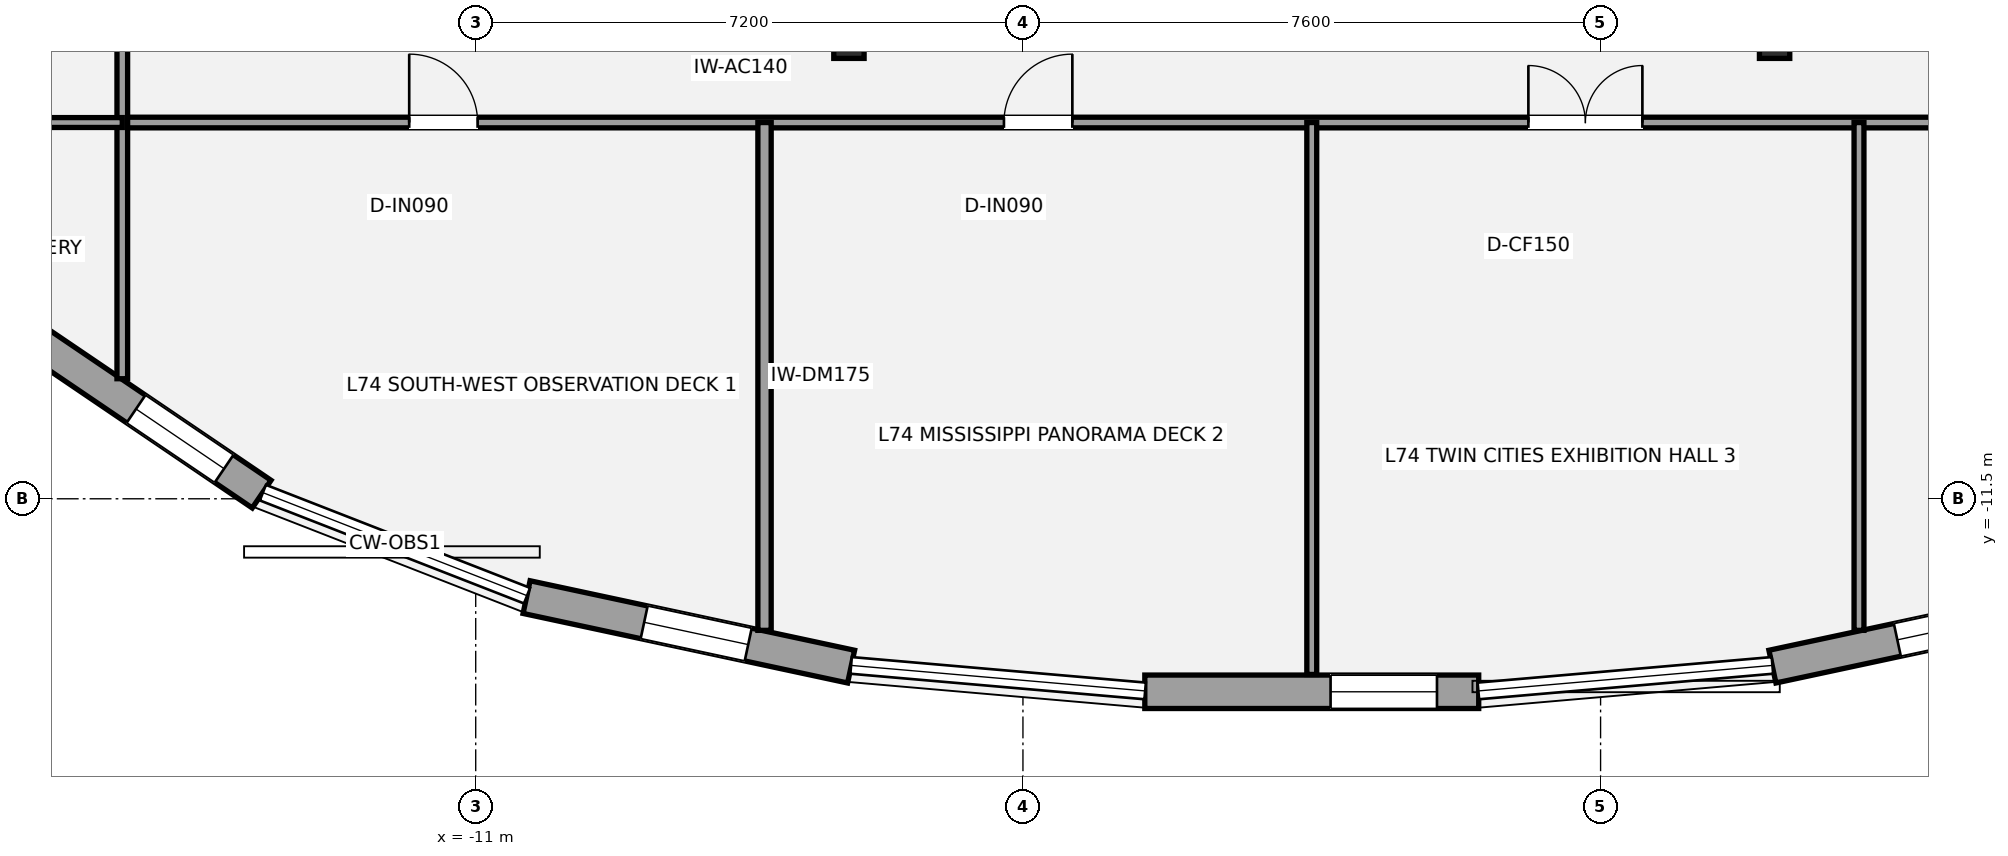
"""IFC4 building model, lengths in metres.
Left out: names, types, materials, properties, quantities, classifications, styles, units other than length and angle.
Written with IfcOpenShell. Run it as: python <this file> out.ifc"""

import sys

from ifc_helpers import new_model, si_unit, direction, frame, frame_2d, origin, origin_2d, place, context, subcontext, project, spatial, rectangle, i_section, extrude, element, fill, save


model = new_model("IFC4")
c1 = context("Model", 3, precision=1e-05, world=origin(), true_north=direction((0.0, 1.0)))
c2 = subcontext(c1, "Body", "Model", "MODEL_VIEW")
j1 = project(units=[si_unit("LENGTHUNIT", "METRE"), si_unit("PLANEANGLEUNIT", "RADIAN")], contexts=[c1])
p1 = place(None, origin())
s1 = spatial("IfcSite", under=j1, at=p1, CompositionType="ELEMENT")
p2 = place(p1, origin())
s2 = spatial("IfcBuilding", under=s1, at=p2, CompositionType="ELEMENT")
p3 = place(p2, frame((0.0, 0.0, 260.4)))
s3 = spatial("IfcBuildingStorey", under=s2, at=p3, CompositionType="ELEMENT", Elevation=260.4)
for number, where, z_axis, x_axis in (
    (1, (-6.09, -5.513, 0.0), (0.0, 0.0, 1.0), (1.0, 0.0, 0.0)),
    (2, (6.09, -5.513, 0.0), (0.0, 0.0, 1.0), (1.0, 0.0, 0.0)),
):
    element("IfcColumn", number, at=place(p3, frame(where, z_axis=z_axis, x_axis=x_axis)), inside=s3, PredefinedType="COLUMN", context=c2, shape_type="SweptSolid", body=[
        extrude(i_section(OverallWidth=0.399, OverallDepth=0.387, WebThickness=0.021, FlangeThickness=0.033, at=origin_2d()), origin(), (0.0, 0.0, 1.0), 4.4),
    ])
p4 = place(p3, frame((-13.817, -11.439, 0.0), z_axis=(0.0, 0.0, 1.0), x_axis=(-0.827716626187, 0.561146314908, 0.0)))
e3 = element("IfcWall", 3, at=p4, inside=s3, PredefinedType="STANDARD", context=c2, shape_type="SweptSolid", body=[
    extrude(rectangle(XDim=3.783, YDim=0.44, at=frame_2d((1.892, 0.0))), origin(), (0.0, 0.0, 1.0), 3.55),
])
p5 = place(p4, frame((0.597, 0.0, 0.58)))
e4 = element("IfcOpeningElement", 4, at=p5, cuts=e3, PredefinedType="OPENING", context=c2, shape_type="SweptSolid", body=[
    extrude(rectangle(XDim=1.4, YDim=1.55, at=frame_2d((0.7, 0.775))), frame((0.0, 0.23, 0.0), z_axis=(0.0, -1.0, 0.0), x_axis=(1.0, 0.0, 0.0)), (0.0, 0.0, 1.0), 0.46),
])
p6 = place(p3, frame((-6.061, -13.708, 0.0), z_axis=(0.0, 0.0, 1.0), x_axis=(-0.977823681193, 0.209429817596, 0.0)))
e5 = element("IfcWall", 5, at=p6, inside=s3, PredefinedType="STANDARD", context=c2, shape_type="SweptSolid", body=[
    extrude(rectangle(XDim=4.367, YDim=0.44, at=frame_2d((2.184, 0.0))), origin(), (0.0, 0.0, 1.0), 3.546),
])
p7 = place(p6, frame((1.385, 0.0, 0.85)))
e6 = element("IfcOpeningElement", 6, at=p7, cuts=e5, PredefinedType="OPENING", context=c2, shape_type="SweptSolid", body=[
    extrude(rectangle(XDim=1.4, YDim=1.55, at=frame_2d((0.7, 0.775))), frame((0.0, 0.23, 0.0), z_axis=(0.0, -1.0, 0.0), x_axis=(1.0, 0.0, 0.0)), (0.0, 0.0, 1.0), 0.46),
])
p8 = place(p3, frame((2.197, -14.039, 0.0), z_axis=(0.0, 0.0, 1.0), x_axis=(-1.0, 0.0, 0.0)))
e7 = element("IfcWall", 7, at=p8, inside=s3, PredefinedType="STANDARD", context=c2, shape_type="SweptSolid", body=[
    extrude(rectangle(XDim=4.393, YDim=0.44, at=frame_2d((2.197, 0.0))), origin(), (0.0, 0.0, 1.0), 3.546),
])
p9 = place(p8, frame((0.549, 0.0, 0.58)))
e8 = element("IfcOpeningElement", 8, at=p9, cuts=e7, PredefinedType="OPENING", context=c2, shape_type="SweptSolid", body=[
    extrude(rectangle(XDim=1.4, YDim=1.55, at=frame_2d((0.7, 0.775))), frame((0.0, 0.23, 0.0), z_axis=(0.0, -1.0, 0.0), x_axis=(1.0, 0.0, 0.0)), (0.0, 0.0, 1.0), 0.46),
])
p10 = place(p3, frame((10.331, -12.794, 0.0), z_axis=(0.0, 0.0, 1.0), x_axis=(-0.977823681193, -0.209429817596, 0.0)))
e9 = element("IfcWall", 9, at=p10, inside=s3, PredefinedType="STANDARD", context=c2, shape_type="SweptSolid", body=[
    extrude(rectangle(XDim=4.367, YDim=0.44, at=frame_2d((2.184, 0.0))), origin(), (0.0, 0.0, 1.0), 3.546),
])
p11 = place(p10, frame((1.286, 0.0, 0.6)))
e10 = element("IfcOpeningElement", 10, at=p11, cuts=e9, PredefinedType="OPENING", context=c2, shape_type="SweptSolid", body=[
    extrude(rectangle(XDim=1.4, YDim=1.55, at=frame_2d((0.7, 0.775))), frame((0.0, 0.23, 0.0), z_axis=(0.0, -1.0, 0.0), x_axis=(1.0, 0.0, 0.0)), (0.0, 0.0, 1.0), 0.46),
])
p12 = place(p3, frame((-15.65, -6.55, 0.0), z_axis=(0.0, 0.0, 1.0), x_axis=(1.0, 0.0, 0.0)))
e11 = element("IfcWall", 11, at=p12, inside=s3, PredefinedType="PARTITIONING", context=c2, shape_type="SweptSolid", body=[
    extrude(rectangle(XDim=31.3, YDim=0.14, at=frame_2d((15.65, 0.0))), origin(), (0.0, 0.0, 1.0), 3.633),
])
p13 = place(p12, frame((3.775, 0.0, 0.0)))
e12 = element("IfcOpeningElement", 12, at=p13, cuts=e11, PredefinedType="OPENING", context=c2, shape_type="SweptSolid", body=[
    extrude(rectangle(XDim=0.9, YDim=2.1, at=frame_2d((0.45, 1.05))), frame((0.0, 0.08, 0.0), z_axis=(0.0, -1.0, 0.0), x_axis=(1.0, 0.0, 0.0)), (0.0, 0.0, 1.0), 0.16),
])
p14 = place(p12, frame((11.6, 0.0, 0.0)))
e13 = element("IfcOpeningElement", 13, at=p14, cuts=e11, PredefinedType="OPENING", context=c2, shape_type="SweptSolid", body=[
    extrude(rectangle(XDim=0.9, YDim=2.1, at=frame_2d((0.45, 1.05))), frame((0.0, 0.08, 0.0), z_axis=(0.0, -1.0, 0.0), x_axis=(1.0, 0.0, 0.0)), (0.0, 0.0, 1.0), 0.16),
])
p15 = place(p12, frame((18.5, 0.0, 0.0)))
e14 = element("IfcOpeningElement", 14, at=p15, cuts=e11, PredefinedType="OPENING", context=c2, shape_type="SweptSolid", body=[
    extrude(rectangle(XDim=1.5, YDim=2.15, at=frame_2d((0.75, 1.075))), frame((0.0, 0.08, 0.0), z_axis=(0.0, -1.0, 0.0), x_axis=(1.0, 0.0, 0.0)), (0.0, 0.0, 1.0), 0.16),
])
p16 = place(p12, frame((26.625, 0.0, 0.0)))
e15 = element("IfcOpeningElement", 15, at=p16, cuts=e11, PredefinedType="OPENING", context=c2, shape_type="SweptSolid", body=[
    extrude(rectangle(XDim=0.9, YDim=2.1, at=frame_2d((0.45, 1.05))), frame((0.0, 0.08, 0.0), z_axis=(0.0, -1.0, 0.0), x_axis=(1.0, 0.0, 0.0)), (0.0, 0.0, 1.0), 0.16),
])
p17 = place(p3, frame((-15.65, -9.921, 0.0), z_axis=(0.0, 0.0, 1.0), x_axis=(0.0, 1.0, 0.0)))
e16 = element("IfcWall", 16, at=p17, inside=s3, PredefinedType="PARTITIONING", context=c2, shape_type="SweptSolid", body=[
    extrude(rectangle(XDim=12.321, YDim=0.14, at=frame_2d((6.16, 0.0))), origin(), (0.0, 0.0, 1.0), 3.567),
])
p18 = place(p17, frame((5.396, 0.0, 0.0)))
e17 = element("IfcOpeningElement", 17, at=p18, cuts=e16, PredefinedType="OPENING", context=c2, shape_type="SweptSolid", body=[
    extrude(rectangle(XDim=0.9, YDim=2.1, at=frame_2d((0.45, 1.05))), frame((0.0, 0.08, 0.0), z_axis=(0.0, -1.0, 0.0), x_axis=(1.0, 0.0, 0.0)), (0.0, 0.0, 1.0), 0.16),
])
p19 = place(p17, frame((10.231, 0.0, 0.0)))
e18 = element("IfcOpeningElement", 18, at=p19, cuts=e16, PredefinedType="OPENING", context=c2, shape_type="SweptSolid", body=[
    extrude(rectangle(XDim=0.9, YDim=2.1, at=frame_2d((0.45, 1.05))), frame((0.0, 0.08, 0.0), z_axis=(0.0, -1.0, 0.0), x_axis=(1.0, 0.0, 0.0)), (0.0, 0.0, 1.0), 0.16),
])
p20 = place(p3, frame((-7.2, -13.231, 0.0), z_axis=(0.0, 0.0, 1.0), x_axis=(0.0, 1.0, 0.0)))
e19 = element("IfcWall", 19, at=p20, inside=s3, PredefinedType="PARTITIONING", context=c2, shape_type="SweptSolid", body=[
    extrude(rectangle(XDim=6.681, YDim=0.175, at=frame_2d((3.34, 0.0))), origin(), (0.0, 0.0, 1.0), 3.633),
])
p21 = place(p3, frame((0.0, -13.811, 0.0), z_axis=(0.0, 0.0, 1.0), x_axis=(0.0, 1.0, 0.0)))
e20 = element("IfcWall", 20, at=p21, inside=s3, PredefinedType="PARTITIONING", context=c2, shape_type="SweptSolid", body=[
    extrude(rectangle(XDim=7.261, YDim=0.13, at=frame_2d((3.631, 0.0))), origin(), (0.0, 0.0, 1.0), 3.633),
])
p22 = place(p3, frame((7.2, -13.231, 0.0), z_axis=(0.0, 0.0, 1.0), x_axis=(0.0, 1.0, 0.0)))
e21 = element("IfcWall", 21, at=p22, inside=s3, PredefinedType="PARTITIONING", context=c2, shape_type="SweptSolid", body=[
    extrude(rectangle(XDim=6.681, YDim=0.13, at=frame_2d((3.34, 0.0))), origin(), (0.0, 0.0, 1.0), 4.18),
])
p23 = place(p3, frame((-18.921, -6.55, 0.0), z_axis=(0.0, 0.0, 1.0), x_axis=(1.0, 0.0, 0.0)))
e22 = element("IfcWall", 22, at=p23, inside=s3, PredefinedType="PARTITIONING", context=c2, shape_type="SweptSolid", body=[
    extrude(rectangle(XDim=3.271, YDim=0.13, at=frame_2d((1.635, 0.0))), origin(), (0.0, 0.0, 1.0), 4.18),
])
p24 = place(p23, frame((0.75, 0.0, 0.0)))
e23 = element("IfcOpeningElement", 23, at=p24, cuts=e22, PredefinedType="OPENING", context=c2, shape_type="SweptSolid", body=[
    extrude(rectangle(XDim=0.9, YDim=2.1, at=frame_2d((0.45, 1.05))), frame((0.0, 0.075, 0.0), z_axis=(0.0, -1.0, 0.0), x_axis=(1.0, 0.0, 0.0)), (0.0, 0.0, 1.0), 0.15),
])
p25 = place(p5, origin())
e24 = element("IfcWindow", 24, at=p25, inside=s3, PartitioningType="SINGLE_PANEL", PredefinedType="WINDOW", context=c2, shape_type="SweptSolid", body=[
    extrude(rectangle(XDim=1.4, YDim=1.55, at=frame_2d((0.7, 0.775))), frame((0.0, -0.01, 0.0), z_axis=(0.0, -1.0, 0.0), x_axis=(1.0, 0.0, 0.0)), (0.0, 0.0, 1.0), 0.06),
])
fill(e4, e24)
p26 = place(p7, origin())
e25 = element("IfcWindow", 25, at=p26, inside=s3, PartitioningType="SINGLE_PANEL", PredefinedType="WINDOW", context=c2, shape_type="SweptSolid", body=[
    extrude(rectangle(XDim=1.4, YDim=1.55, at=frame_2d((0.7, 0.775))), frame((0.0, -0.01, 0.0), z_axis=(0.0, -1.0, 0.0), x_axis=(1.0, 0.0, 0.0)), (0.0, 0.0, 1.0), 0.06),
])
fill(e6, e25)
p27 = place(p9, origin())
e26 = element("IfcWindow", 26, at=p27, inside=s3, PartitioningType="SINGLE_PANEL", PredefinedType="WINDOW", context=c2, shape_type="SweptSolid", body=[
    extrude(rectangle(XDim=1.4, YDim=1.55, at=frame_2d((0.7, 0.775))), frame((0.0, -0.01, 0.0), z_axis=(0.0, -1.0, 0.0), x_axis=(1.0, 0.0, 0.0)), (0.0, 0.0, 1.0), 0.06),
])
fill(e8, e26)
p28 = place(p11, origin())
e27 = element("IfcWindow", 27, at=p28, inside=s3, PartitioningType="SINGLE_PANEL", PredefinedType="WINDOW", context=c2, shape_type="SweptSolid", body=[
    extrude(rectangle(XDim=1.4, YDim=1.55, at=frame_2d((0.7, 0.775))), frame((0.0, -0.01, 0.0), z_axis=(0.0, -1.0, 0.0), x_axis=(1.0, 0.0, 0.0)), (0.0, 0.0, 1.0), 0.06),
])
fill(e10, e27)
p29 = place(p13, origin())
e28 = element("IfcDoor", 28, at=p29, inside=s3, OperationType="SINGLE_SWING_LEFT", PredefinedType="DOOR", context=c2, shape_type="SweptSolid", body=[
    extrude(rectangle(XDim=0.9, YDim=2.1, at=frame_2d((0.45, 1.05))), frame((0.0, 0.025, 0.0), z_axis=(0.0, -1.0, 0.0), x_axis=(1.0, 0.0, 0.0)), (0.0, 0.0, 1.0), 0.05),
])
fill(e12, e28)
p30 = place(p14, origin())
e29 = element("IfcDoor", 29, at=p30, inside=s3, OperationType="SINGLE_SWING_RIGHT", PredefinedType="DOOR", context=c2, shape_type="SweptSolid", body=[
    extrude(rectangle(XDim=0.9, YDim=2.1, at=frame_2d((0.45, 1.05))), frame((0.0, 0.025, 0.0), z_axis=(0.0, -1.0, 0.0), x_axis=(1.0, 0.0, 0.0)), (0.0, 0.0, 1.0), 0.05),
])
fill(e13, e29)
p31 = place(p15, origin())
e30 = element("IfcDoor", 30, at=p31, inside=s3, OperationType="DOUBLE_DOOR_SINGLE_SWING", PredefinedType="DOOR", context=c2, shape_type="SweptSolid", body=[
    extrude(rectangle(XDim=1.5, YDim=2.15, at=frame_2d((0.75, 1.075))), frame((0.0, 0.025, 0.0), z_axis=(0.0, -1.0, 0.0), x_axis=(1.0, 0.0, 0.0)), (0.0, 0.0, 1.0), 0.05),
])
fill(e14, e30)
save(model, sys.argv[1])
